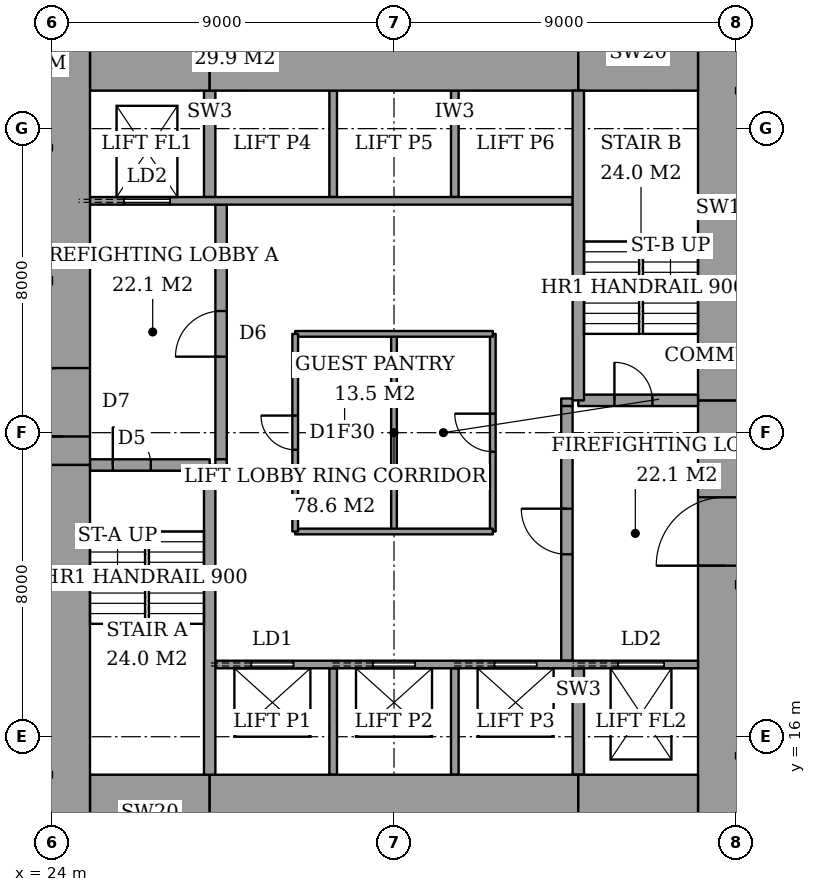
"""IFC4 building model, lengths in metres.
Left out: names, types, materials, properties, quantities, classifications, styles, units other than length and angle.
Written with IfcOpenShell. Run it as: python <this file> out.ifc"""

import sys

from ifc_helpers import new_model, si_unit, direction, frame, frame_2d, origin, place, context, subcontext, project, spatial, rectangle, extrude, element, fill, save


model = new_model("IFC4")
c1 = context("Model", 3, precision=1e-05, world=origin(), true_north=direction((0.0, 1.0)))
c2 = subcontext(c1, "Body", "Model", "MODEL_VIEW")
j1 = project(units=[si_unit("LENGTHUNIT", "METRE"), si_unit("PLANEANGLEUNIT", "RADIAN")], contexts=[c1])
p1 = place(None, origin())
s1 = spatial("IfcSite", under=j1, at=p1, CompositionType="ELEMENT")
p2 = place(p1, origin())
s2 = spatial("IfcBuilding", under=s1, at=p2, CompositionType="ELEMENT")
p3 = place(p2, frame((0.0, 0.0, 114.2)))
s3 = spatial("IfcBuildingStorey", under=s2, at=p3, CompositionType="ELEMENT", Elevation=114.2)
p4 = place(p3, frame((25.0, 14.0, 0.0), z_axis=(0.0, 0.0, 1.0), x_axis=(1.0, 0.0, 0.0)))
e1 = element("IfcWall", 1, at=p4, inside=s3, PredefinedType="SHEAR", context=c2, shape_type="SweptSolid", body=[
    extrude(rectangle(XDim=3.15, YDim=2.0, at=frame_2d((1.575, 0.0))), origin(), (0.0, 0.0, 1.0), 3.6),
])
p5 = place(p3, frame((28.15, 14.0, 0.0), z_axis=(0.0, 0.0, 1.0), x_axis=(1.0, 0.0, 0.0)))
e2 = element("IfcWall", 2, at=p5, inside=s3, PredefinedType="SHEAR", context=c2, shape_type="SweptSolid", body=[
    extrude(rectangle(XDim=9.7, YDim=2.0, at=frame_2d((4.85, 0.0))), origin(), (0.0, 0.0, 1.0), 3.6),
])
for number, where, z_axis, x_axis in (
    (3, (37.85, 14.0, 0.0), (0.0, 0.0, 1.0), (1.0, 0.0, 0.0)),
    (4, (25.0, 34.0, 0.0), (0.0, 0.0, 1.0), (1.0, 0.0, 0.0)),
):
    element("IfcWall", number, at=place(p3, frame(where, z_axis=z_axis, x_axis=x_axis)), inside=s3, PredefinedType="SHEAR", context=c2, shape_type="SweptSolid", body=[
        extrude(rectangle(XDim=3.15, YDim=2.0, at=frame_2d((1.575, 0.0))), origin(), (0.0, 0.0, 1.0), 3.6),
    ])
p6 = place(p3, frame((28.15, 34.0, 0.0), z_axis=(0.0, 0.0, 1.0), x_axis=(1.0, 0.0, 0.0)))
e5 = element("IfcWall", 5, at=p6, inside=s3, PredefinedType="SHEAR", context=c2, shape_type="SweptSolid", body=[
    extrude(rectangle(XDim=9.7, YDim=2.0, at=frame_2d((4.85, 0.0))), origin(), (0.0, 0.0, 1.0), 3.6),
])
p7 = place(p3, frame((37.85, 34.0, 0.0), z_axis=(0.0, 0.0, 1.0), x_axis=(1.0, 0.0, 0.0)))
e6 = element("IfcWall", 6, at=p7, inside=s3, PredefinedType="SHEAR", context=c2, shape_type="SweptSolid", body=[
    extrude(rectangle(XDim=3.15, YDim=2.0, at=frame_2d((1.575, 0.0))), origin(), (0.0, 0.0, 1.0), 3.6),
])
p8 = place(p3, frame((24.3, 13.0, 0.0), z_axis=(0.0, 0.0, 1.0), x_axis=(0.0, 1.0, 0.0)))
e7 = element("IfcWall", 7, at=p8, inside=s3, PredefinedType="SHEAR", context=c2, shape_type="SweptSolid", body=[
    extrude(rectangle(XDim=10.15, YDim=1.4, at=frame_2d((5.075, 0.0))), origin(), (0.0, 0.0, 1.0), 3.6),
])
p9 = place(p3, frame((24.3, 23.15, 0.0), z_axis=(0.0, 0.0, 1.0), x_axis=(0.0, 1.0, 0.0)))
e8 = element("IfcWall", 8, at=p9, inside=s3, PredefinedType="SHEAR", context=c2, shape_type="SweptSolid", body=[
    extrude(rectangle(XDim=11.85, YDim=1.4, at=frame_2d((5.925, 0.0))), origin(), (0.0, 0.0, 1.0), 3.6),
])
p10 = place(p9, frame((0.75, 0.0, 0.0)))
e9 = element("IfcOpeningElement", 9, at=p10, cuts=e8, PredefinedType="OPENING", context=c2, shape_type="SweptSolid", body=[
    extrude(rectangle(XDim=1.8, YDim=2.4, at=frame_2d((0.9, 1.2))), frame((0.0, 0.71, 0.0), z_axis=(0.0, -1.0, 0.0), x_axis=(1.0, 0.0, 0.0)), (0.0, 0.0, 1.0), 1.42),
])
p11 = place(p3, frame((41.7, 13.0, 0.0), z_axis=(0.0, 0.0, 1.0), x_axis=(0.0, 1.0, 0.0)))
e10 = element("IfcWall", 10, at=p11, inside=s3, PredefinedType="SHEAR", context=c2, shape_type="SweptSolid", body=[
    extrude(rectangle(XDim=11.85, YDim=1.4, at=frame_2d((5.925, 0.0))), origin(), (0.0, 0.0, 1.0), 3.6),
])
p12 = place(p11, frame((7.5, 0.0, 0.0)))
e11 = element("IfcOpeningElement", 11, at=p12, cuts=e10, PredefinedType="OPENING", context=c2, shape_type="SweptSolid", body=[
    extrude(rectangle(XDim=1.8, YDim=2.4, at=frame_2d((0.9, 1.2))), frame((0.0, 0.71, 0.0), z_axis=(0.0, -1.0, 0.0), x_axis=(1.0, 0.0, 0.0)), (0.0, 0.0, 1.0), 1.42),
])
p13 = place(p3, frame((41.7, 24.85, 0.0), z_axis=(0.0, 0.0, 1.0), x_axis=(0.0, 1.0, 0.0)))
e12 = element("IfcWall", 12, at=p13, inside=s3, PredefinedType="SHEAR", context=c2, shape_type="SweptSolid", body=[
    extrude(rectangle(XDim=10.15, YDim=1.4, at=frame_2d((5.075, 0.0))), origin(), (0.0, 0.0, 1.0), 3.6),
])
p14 = place(p3, frame((28.15, 15.0, 0.0), z_axis=(0.0, 0.0, 1.0), x_axis=(0.0, 1.0, 0.0)))
e13 = element("IfcWall", 13, at=p14, inside=s3, PredefinedType="SHEAR", context=c2, shape_type="SweptSolid", body=[
    extrude(rectangle(XDim=8.15, YDim=0.3, at=frame_2d((4.075, 0.0))), origin(), (0.0, 0.0, 1.0), 3.6),
])
p15 = place(p3, frame((25.0, 23.15, 0.0), z_axis=(0.0, 0.0, 1.0), x_axis=(1.0, 0.0, 0.0)))
e14 = element("IfcWall", 14, at=p15, inside=s3, PredefinedType="SHEAR", context=c2, shape_type="SweptSolid", body=[
    extrude(rectangle(XDim=3.15, YDim=0.3, at=frame_2d((1.575, 0.0))), origin(), (0.0, 0.0, 1.0), 3.6),
])
p16 = place(p15, frame((0.6, 0.0, 0.0)))
e15 = element("IfcOpeningElement", 15, at=p16, cuts=e14, PredefinedType="OPENING", context=c2, shape_type="SweptSolid", body=[
    extrude(rectangle(XDim=1.0, YDim=2.1, at=frame_2d((0.5, 1.05))), frame((0.0, 0.16, 0.0), z_axis=(0.0, -1.0, 0.0), x_axis=(1.0, 0.0, 0.0)), (0.0, 0.0, 1.0), 0.32),
])
p17 = place(p3, frame((37.85, 24.85, 0.0), z_axis=(0.0, 0.0, 1.0), x_axis=(0.0, 1.0, 0.0)))
e16 = element("IfcWall", 16, at=p17, inside=s3, PredefinedType="SHEAR", context=c2, shape_type="SweptSolid", body=[
    extrude(rectangle(XDim=8.15, YDim=0.3, at=frame_2d((4.075, 0.0))), origin(), (0.0, 0.0, 1.0), 3.6),
])
p18 = place(p3, frame((37.85, 24.85, 0.0), z_axis=(0.0, 0.0, 1.0), x_axis=(1.0, 0.0, 0.0)))
e17 = element("IfcWall", 17, at=p18, inside=s3, PredefinedType="SHEAR", context=c2, shape_type="SweptSolid", body=[
    extrude(rectangle(XDim=3.15, YDim=0.3, at=frame_2d((1.575, 0.0))), origin(), (0.0, 0.0, 1.0), 3.6),
])
p19 = place(p18, frame((0.95, 0.0, 0.0)))
e18 = element("IfcOpeningElement", 18, at=p19, cuts=e17, PredefinedType="OPENING", context=c2, shape_type="SweptSolid", body=[
    extrude(rectangle(XDim=1.0, YDim=2.1, at=frame_2d((0.5, 1.05))), frame((0.0, 0.16, 0.0), z_axis=(0.0, -1.0, 0.0), x_axis=(1.0, 0.0, 0.0)), (0.0, 0.0, 1.0), 0.32),
])
p20 = place(p3, frame((28.45, 23.3, 0.0), z_axis=(0.0, 0.0, 1.0), x_axis=(0.0, 1.0, 0.0)))
e19 = element("IfcWall", 19, at=p20, inside=s3, PredefinedType="PARTITIONING", context=c2, shape_type="SweptSolid", body=[
    extrude(rectangle(XDim=6.7, YDim=0.3, at=frame_2d((3.35, 0.0))), origin(), (0.0, 0.0, 1.0), 3.6),
])
p21 = place(p20, frame((2.7, 0.0, 0.0)))
e20 = element("IfcOpeningElement", 20, at=p21, cuts=e19, PredefinedType="OPENING", context=c2, shape_type="SweptSolid", body=[
    extrude(rectangle(XDim=1.2, YDim=2.1, at=frame_2d((0.6, 1.05))), frame((0.0, 0.16, 0.0), z_axis=(0.0, -1.0, 0.0), x_axis=(1.0, 0.0, 0.0)), (0.0, 0.0, 1.0), 0.32),
])
p22 = place(p3, frame((37.55, 18.0, 0.0), z_axis=(0.0, 0.0, 1.0), x_axis=(0.0, 1.0, 0.0)))
e21 = element("IfcWall", 21, at=p22, inside=s3, PredefinedType="PARTITIONING", context=c2, shape_type="SweptSolid", body=[
    extrude(rectangle(XDim=6.7, YDim=0.3, at=frame_2d((3.35, 0.0))), origin(), (0.0, 0.0, 1.0), 3.6),
])
p23 = place(p22, frame((2.8, 0.0, 0.0)))
e22 = element("IfcOpeningElement", 22, at=p23, cuts=e21, PredefinedType="OPENING", context=c2, shape_type="SweptSolid", body=[
    extrude(rectangle(XDim=1.2, YDim=2.1, at=frame_2d((0.6, 1.05))), frame((0.0, 0.16, 0.0), z_axis=(0.0, -1.0, 0.0), x_axis=(1.0, 0.0, 0.0)), (0.0, 0.0, 1.0), 0.32),
])
p24 = place(p3, frame((28.3, 17.9, 0.0), z_axis=(0.0, 0.0, 1.0), x_axis=(1.0, 0.0, 0.0)))
e23 = element("IfcWall", 23, at=p24, inside=s3, PredefinedType="PARTITIONING", context=c2, shape_type="SweptSolid", body=[
    extrude(rectangle(XDim=12.7, YDim=0.2, at=frame_2d((6.35, 0.0))), origin(), (0.0, 0.0, 1.0), 3.6),
])
p25 = place(p24, frame((0.95, 0.0, 0.0)))
e24 = element("IfcOpeningElement", 24, at=p25, cuts=e23, PredefinedType="OPENING", context=c2, shape_type="SweptSolid", body=[
    extrude(rectangle(XDim=1.1, YDim=2.1, at=frame_2d((0.55, 1.05))), frame((0.0, 0.11, 0.0), z_axis=(0.0, -1.0, 0.0), x_axis=(1.0, 0.0, 0.0)), (0.0, 0.0, 1.0), 0.22),
])
p26 = place(p24, frame((4.15, 0.0, 0.0)))
e25 = element("IfcOpeningElement", 25, at=p26, cuts=e23, PredefinedType="OPENING", context=c2, shape_type="SweptSolid", body=[
    extrude(rectangle(XDim=1.1, YDim=2.1, at=frame_2d((0.55, 1.05))), frame((0.0, 0.11, 0.0), z_axis=(0.0, -1.0, 0.0), x_axis=(1.0, 0.0, 0.0)), (0.0, 0.0, 1.0), 0.22),
])
p27 = place(p24, frame((7.35, 0.0, 0.0)))
e26 = element("IfcOpeningElement", 26, at=p27, cuts=e23, PredefinedType="OPENING", context=c2, shape_type="SweptSolid", body=[
    extrude(rectangle(XDim=1.1, YDim=2.1, at=frame_2d((0.55, 1.05))), frame((0.0, 0.11, 0.0), z_axis=(0.0, -1.0, 0.0), x_axis=(1.0, 0.0, 0.0)), (0.0, 0.0, 1.0), 0.22),
])
p28 = place(p24, frame((10.6, 0.0, 0.0)))
e27 = element("IfcOpeningElement", 27, at=p28, cuts=e23, PredefinedType="OPENING", context=c2, shape_type="SweptSolid", body=[
    extrude(rectangle(XDim=1.2, YDim=2.1, at=frame_2d((0.6, 1.05))), frame((0.0, 0.11, 0.0), z_axis=(0.0, -1.0, 0.0), x_axis=(1.0, 0.0, 0.0)), (0.0, 0.0, 1.0), 0.22),
])
p29 = place(p3, frame((25.0, 30.1, 0.0), z_axis=(0.0, 0.0, 1.0), x_axis=(1.0, 0.0, 0.0)))
e28 = element("IfcWall", 28, at=p29, inside=s3, PredefinedType="PARTITIONING", context=c2, shape_type="SweptSolid", body=[
    extrude(rectangle(XDim=12.7, YDim=0.2, at=frame_2d((6.35, 0.0))), origin(), (0.0, 0.0, 1.0), 3.6),
])
p30 = place(p29, frame((0.9, 0.0, 0.0)))
e29 = element("IfcOpeningElement", 29, at=p30, cuts=e28, PredefinedType="OPENING", context=c2, shape_type="SweptSolid", body=[
    extrude(rectangle(XDim=1.2, YDim=2.1, at=frame_2d((0.6, 1.05))), frame((0.0, 0.11, 0.0), z_axis=(0.0, -1.0, 0.0), x_axis=(1.0, 0.0, 0.0)), (0.0, 0.0, 1.0), 0.22),
])
for number, where, z_axis, x_axis in (
    (30, (31.4, 15.0, 0.0), (0.0, 0.0, 1.0), (0.0, 1.0, 0.0)),
    (31, (34.6, 15.0, 0.0), (0.0, 0.0, 1.0), (0.0, 1.0, 0.0)),
):
    element("IfcWall", number, at=place(p3, frame(where, z_axis=z_axis, x_axis=x_axis)), inside=s3, PredefinedType="PARTITIONING", context=c2, shape_type="SweptSolid", body=[
        extrude(rectangle(XDim=2.8, YDim=0.2, at=frame_2d((1.4, 0.0))), origin(), (0.0, 0.0, 1.0), 3.6),
    ])
p31 = place(p3, frame((37.85, 15.0, 0.0), z_axis=(0.0, 0.0, 1.0), x_axis=(0.0, 1.0, 0.0)))
e32 = element("IfcWall", 32, at=p31, inside=s3, PredefinedType="SHEAR", context=c2, shape_type="SweptSolid", body=[
    extrude(rectangle(XDim=2.8, YDim=0.3, at=frame_2d((1.4, 0.0))), origin(), (0.0, 0.0, 1.0), 3.6),
])
for number, where, z_axis, x_axis in (
    (33, (31.4, 30.2, 0.0), (0.0, 0.0, 1.0), (0.0, 1.0, 0.0)),
    (34, (34.6, 30.2, 0.0), (0.0, 0.0, 1.0), (0.0, 1.0, 0.0)),
):
    element("IfcWall", number, at=place(p3, frame(where, z_axis=z_axis, x_axis=x_axis)), inside=s3, PredefinedType="PARTITIONING", context=c2, shape_type="SweptSolid", body=[
        extrude(rectangle(XDim=2.8, YDim=0.2, at=frame_2d((1.4, 0.0))), origin(), (0.0, 0.0, 1.0), 3.6),
    ])
p32 = place(p3, frame((28.15, 30.2, 0.0), z_axis=(0.0, 0.0, 1.0), x_axis=(0.0, 1.0, 0.0)))
e35 = element("IfcWall", 35, at=p32, inside=s3, PredefinedType="SHEAR", context=c2, shape_type="SweptSolid", body=[
    extrude(rectangle(XDim=2.8, YDim=0.3, at=frame_2d((1.4, 0.0))), origin(), (0.0, 0.0, 1.0), 3.6),
])
for number, where, z_axis, x_axis in (
    (36, (28.3, 23.2, 0.0), (0.0, 0.0, 1.0), (1.0, 0.0, 0.0)),
    (37, (37.4, 24.8, 0.0), (0.0, 0.0, 1.0), (1.0, 0.0, 0.0)),
):
    element("IfcWall", number, at=place(p3, frame(where, z_axis=z_axis, x_axis=x_axis)), inside=s3, PredefinedType="PARTITIONING", context=c2, shape_type="SweptSolid", body=[
        extrude(rectangle(XDim=0.3, YDim=0.2, at=frame_2d((0.15, 0.0))), origin(), (0.0, 0.0, 1.0), 3.6),
    ])
for number, where, z_axis, x_axis in (
    (38, (30.4, 21.4, 0.0), (0.0, 0.0, 1.0), (1.0, 0.0, 0.0)),
    (39, (30.4, 26.6, 0.0), (0.0, 0.0, 1.0), (1.0, 0.0, 0.0)),
):
    element("IfcWall", number, at=place(p3, frame(where, z_axis=z_axis, x_axis=x_axis)), inside=s3, PredefinedType="PARTITIONING", context=c2, shape_type="SweptSolid", body=[
        extrude(rectangle(XDim=5.2, YDim=0.15, at=frame_2d((2.6, 0.0))), origin(), (0.0, 0.0, 1.0), 3.35),
    ])
p33 = place(p3, frame((30.4, 21.4, 0.0), z_axis=(0.0, 0.0, 1.0), x_axis=(0.0, 1.0, 0.0)))
e40 = element("IfcWall", 40, at=p33, inside=s3, PredefinedType="PARTITIONING", context=c2, shape_type="SweptSolid", body=[
    extrude(rectangle(XDim=5.2, YDim=0.15, at=frame_2d((2.6, 0.0))), origin(), (0.0, 0.0, 1.0), 3.35),
])
p34 = place(p33, frame((2.15, 0.0, 0.0)))
e41 = element("IfcOpeningElement", 41, at=p34, cuts=e40, PredefinedType="OPENING", context=c2, shape_type="SweptSolid", body=[
    extrude(rectangle(XDim=0.9, YDim=2.1, at=frame_2d((0.45, 1.05))), frame((0.0, 0.085, 0.0), z_axis=(0.0, -1.0, 0.0), x_axis=(1.0, 0.0, 0.0)), (0.0, 0.0, 1.0), 0.17),
])
p35 = place(p3, frame((35.6, 21.4, 0.0), z_axis=(0.0, 0.0, 1.0), x_axis=(0.0, 1.0, 0.0)))
e42 = element("IfcWall", 42, at=p35, inside=s3, PredefinedType="PARTITIONING", context=c2, shape_type="SweptSolid", body=[
    extrude(rectangle(XDim=5.2, YDim=0.15, at=frame_2d((2.6, 0.0))), origin(), (0.0, 0.0, 1.0), 3.35),
])
p36 = place(p35, frame((2.1, 0.0, 0.0)))
e43 = element("IfcOpeningElement", 43, at=p36, cuts=e42, PredefinedType="OPENING", context=c2, shape_type="SweptSolid", body=[
    extrude(rectangle(XDim=1.0, YDim=2.1, at=frame_2d((0.5, 1.05))), frame((0.0, 0.085, 0.0), z_axis=(0.0, -1.0, 0.0), x_axis=(1.0, 0.0, 0.0)), (0.0, 0.0, 1.0), 0.17),
])
p37 = place(p3, frame((33.0, 21.4, 0.0), z_axis=(0.0, 0.0, 1.0), x_axis=(0.0, 1.0, 0.0)))
e44 = element("IfcWall", 44, at=p37, inside=s3, PredefinedType="PARTITIONING", context=c2, shape_type="SweptSolid", body=[
    extrude(rectangle(XDim=5.2, YDim=0.15, at=frame_2d((2.6, 0.0))), origin(), (0.0, 0.0, 1.0), 3.35),
])
p38 = place(p16, origin())
e45 = element("IfcDoor", 45, at=p38, inside=s3, OperationType="SINGLE_SWING_RIGHT", PredefinedType="DOOR", context=c2, shape_type="SweptSolid", body=[
    extrude(rectangle(XDim=1.0, YDim=2.1, at=frame_2d((0.5, 1.05))), frame((0.0, 0.025, 0.0), z_axis=(0.0, -1.0, 0.0), x_axis=(1.0, 0.0, 0.0)), (0.0, 0.0, 1.0), 0.05),
])
fill(e15, e45)
p39 = place(p19, origin())
e46 = element("IfcDoor", 46, at=p39, inside=s3, OperationType="SINGLE_SWING_RIGHT", PredefinedType="DOOR", context=c2, shape_type="SweptSolid", body=[
    extrude(rectangle(XDim=1.0, YDim=2.1, at=frame_2d((0.5, 1.05))), frame((0.0, 0.025, 0.0), z_axis=(0.0, -1.0, 0.0), x_axis=(1.0, 0.0, 0.0)), (0.0, 0.0, 1.0), 0.05),
])
fill(e18, e46)
p40 = place(p21, origin())
e47 = element("IfcDoor", 47, at=p40, inside=s3, OperationType="SINGLE_SWING_RIGHT", PredefinedType="DOOR", context=c2, shape_type="SweptSolid", body=[
    extrude(rectangle(XDim=1.2, YDim=2.1, at=frame_2d((0.6, 1.05))), frame((0.0, 0.025, 0.0), z_axis=(0.0, -1.0, 0.0), x_axis=(1.0, 0.0, 0.0)), (0.0, 0.0, 1.0), 0.05),
])
fill(e20, e47)
p41 = place(p23, origin())
e48 = element("IfcDoor", 48, at=p41, inside=s3, OperationType="SINGLE_SWING_LEFT", PredefinedType="DOOR", context=c2, shape_type="SweptSolid", body=[
    extrude(rectangle(XDim=1.2, YDim=2.1, at=frame_2d((0.6, 1.05))), frame((0.0, 0.025, 0.0), z_axis=(0.0, -1.0, 0.0), x_axis=(1.0, 0.0, 0.0)), (0.0, 0.0, 1.0), 0.05),
])
fill(e22, e48)
p42 = place(p10, origin())
e49 = element("IfcDoor", 49, at=p42, inside=s3, OperationType="DOUBLE_DOOR_DOUBLE_SWING", PredefinedType="DOOR", context=c2, shape_type="SweptSolid", body=[
    extrude(rectangle(XDim=1.8, YDim=2.4, at=frame_2d((0.9, 1.2))), frame((0.0, 0.025, 0.0), z_axis=(0.0, -1.0, 0.0), x_axis=(1.0, 0.0, 0.0)), (0.0, 0.0, 1.0), 0.05),
])
fill(e9, e49)
p43 = place(p12, origin())
e50 = element("IfcDoor", 50, at=p43, inside=s3, OperationType="DOUBLE_DOOR_DOUBLE_SWING", PredefinedType="DOOR", context=c2, shape_type="SweptSolid", body=[
    extrude(rectangle(XDim=1.8, YDim=2.4, at=frame_2d((0.9, 1.2))), frame((0.0, 0.025, 0.0), z_axis=(0.0, -1.0, 0.0), x_axis=(1.0, 0.0, 0.0)), (0.0, 0.0, 1.0), 0.05),
])
fill(e11, e50)
p44 = place(p34, origin())
e51 = element("IfcDoor", 51, at=p44, inside=s3, OperationType="SINGLE_SWING_LEFT", PredefinedType="DOOR", context=c2, shape_type="SweptSolid", body=[
    extrude(rectangle(XDim=0.9, YDim=2.1, at=frame_2d((0.45, 1.05))), frame((0.0, 0.025, 0.0), z_axis=(0.0, -1.0, 0.0), x_axis=(1.0, 0.0, 0.0)), (0.0, 0.0, 1.0), 0.05),
])
fill(e41, e51)
p45 = place(p36, origin())
e52 = element("IfcDoor", 52, at=p45, inside=s3, OperationType="SINGLE_SWING_LEFT", PredefinedType="DOOR", context=c2, shape_type="SweptSolid", body=[
    extrude(rectangle(XDim=1.0, YDim=2.1, at=frame_2d((0.5, 1.05))), frame((0.0, 0.025, 0.0), z_axis=(0.0, -1.0, 0.0), x_axis=(1.0, 0.0, 0.0)), (0.0, 0.0, 1.0), 0.05),
])
fill(e43, e52)
p46 = place(p25, origin())
e53 = element("IfcDoor", 53, at=p46, inside=s3, OperationType="SLIDING_TO_LEFT", PredefinedType="DOOR", context=c2, shape_type="SweptSolid", body=[
    extrude(rectangle(XDim=1.1, YDim=2.1, at=frame_2d((0.55, 1.05))), frame((0.0, 0.025, 0.0), z_axis=(0.0, -1.0, 0.0), x_axis=(1.0, 0.0, 0.0)), (0.0, 0.0, 1.0), 0.05),
])
fill(e24, e53)
p47 = place(p26, origin())
e54 = element("IfcDoor", 54, at=p47, inside=s3, OperationType="SLIDING_TO_LEFT", PredefinedType="DOOR", context=c2, shape_type="SweptSolid", body=[
    extrude(rectangle(XDim=1.1, YDim=2.1, at=frame_2d((0.55, 1.05))), frame((0.0, 0.025, 0.0), z_axis=(0.0, -1.0, 0.0), x_axis=(1.0, 0.0, 0.0)), (0.0, 0.0, 1.0), 0.05),
])
fill(e25, e54)
p48 = place(p27, origin())
e55 = element("IfcDoor", 55, at=p48, inside=s3, OperationType="SLIDING_TO_LEFT", PredefinedType="DOOR", context=c2, shape_type="SweptSolid", body=[
    extrude(rectangle(XDim=1.1, YDim=2.1, at=frame_2d((0.55, 1.05))), frame((0.0, 0.025, 0.0), z_axis=(0.0, -1.0, 0.0), x_axis=(1.0, 0.0, 0.0)), (0.0, 0.0, 1.0), 0.05),
])
fill(e26, e55)
p49 = place(p30, origin())
e56 = element("IfcDoor", 56, at=p49, inside=s3, OperationType="SLIDING_TO_LEFT", PredefinedType="DOOR", context=c2, shape_type="SweptSolid", body=[
    extrude(rectangle(XDim=1.2, YDim=2.1, at=frame_2d((0.6, 1.05))), frame((0.0, 0.025, 0.0), z_axis=(0.0, -1.0, 0.0), x_axis=(1.0, 0.0, 0.0)), (0.0, 0.0, 1.0), 0.05),
])
fill(e29, e56)
p50 = place(p28, origin())
e57 = element("IfcDoor", 57, at=p50, inside=s3, OperationType="SLIDING_TO_LEFT", PredefinedType="DOOR", context=c2, shape_type="SweptSolid", body=[
    extrude(rectangle(XDim=1.2, YDim=2.1, at=frame_2d((0.6, 1.05))), frame((0.0, 0.025, 0.0), z_axis=(0.0, -1.0, 0.0), x_axis=(1.0, 0.0, 0.0)), (0.0, 0.0, 1.0), 0.05),
])
fill(e27, e57)
save(model, sys.argv[1])
